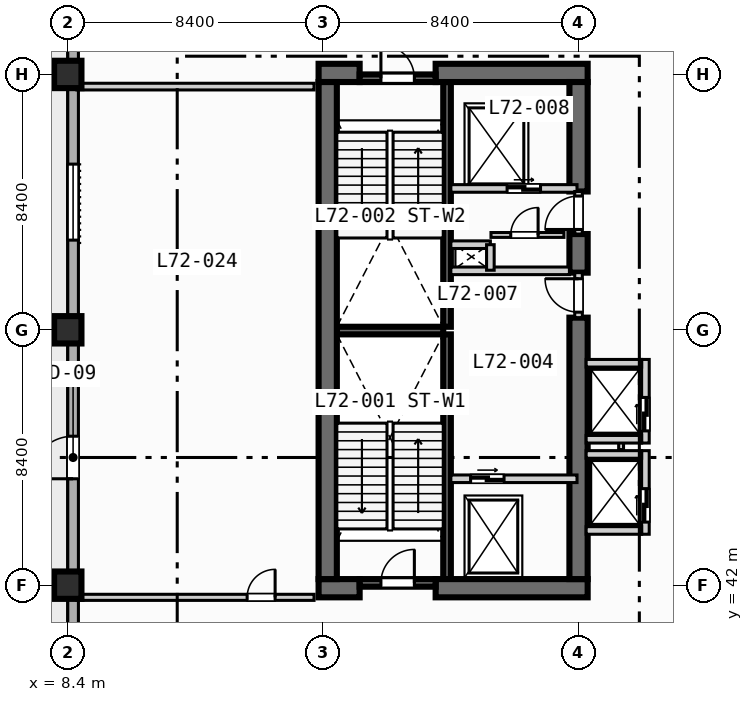
"""IFC4 building model, lengths in metres.
Left out: names, types, materials, properties, quantities, classifications, styles, units other than length and angle.
Written with IfcOpenShell. Run it as: python <this file> out.ifc"""

import sys

from ifc_helpers import new_model, si_unit, direction, frame, frame_2d, origin, origin_2d, place, context, subcontext, project, spatial, rectangle, extrude, element, fill, save


model = new_model("IFC4")
c1 = context("Model", 3, precision=1e-05, world=origin(), true_north=direction((0.0, 1.0)))
c2 = subcontext(c1, "Body", "Model", "MODEL_VIEW")
j1 = project(units=[si_unit("LENGTHUNIT", "METRE"), si_unit("PLANEANGLEUNIT", "RADIAN")], contexts=[c1])
p1 = place(None, origin())
s1 = spatial("IfcSite", under=j1, at=p1, CompositionType="ELEMENT")
p2 = place(p1, origin())
s2 = spatial("IfcBuilding", under=s1, at=p2, CompositionType="ELEMENT")
p3 = place(p2, frame((0.0, 0.0, 290.4)))
s3 = spatial("IfcBuildingStorey", under=s2, at=p3, CompositionType="ELEMENT", Elevation=290.4)
for number, where, z_axis, x_axis in (
    (1, (20.875, 42.2, 0.0), (0.0, 0.0, 1.0), (0.0, 1.0, 0.0)),
    (2, (20.875, 50.5, 0.0), (0.0, 0.0, 1.0), (0.0, 1.0, 0.0)),
):
    element("IfcWall", number, at=place(p3, frame(where, z_axis=z_axis, x_axis=x_axis)), inside=s3, PredefinedType="SOLIDWALL", context=c2, shape_type="SweptSolid", body=[
        extrude(rectangle(XDim=8.05, YDim=0.25, at=frame_2d((4.025, 0.0))), origin(), (0.0, 0.0, 1.0), 4.05),
    ])
p4 = place(p3, frame((17.25, 50.375, 0.0), z_axis=(0.0, 0.0, 1.0), x_axis=(1.0, 0.0, 0.0)))
e3 = element("IfcWall", 3, at=p4, inside=s3, PredefinedType="SOLIDWALL", context=c2, shape_type="SweptSolid", body=[
    extrude(rectangle(XDim=3.5, YDim=0.25, at=frame_2d((1.75, 0.0))), origin(), (0.0, 0.0, 1.0), 4.05),
])
p5 = place(p3, frame((16.65, 41.9, 0.0), z_axis=(0.0, 0.0, 1.0), x_axis=(1.0, 0.0, 0.0)))
e4 = element("IfcWall", 4, at=p5, inside=s3, PredefinedType="SHEAR", context=c2, shape_type="SweptSolid", body=[
    extrude(rectangle(XDim=1.35, YDim=0.6, at=frame_2d((0.675, 0.0))), origin(), (0.0, 0.0, 1.0), 4.05),
])
p6 = place(p3, frame((20.5, 41.9, 0.0), z_axis=(0.0, 0.0, 1.0), x_axis=(1.0, 0.0, 0.0)))
e5 = element("IfcWall", 5, at=p6, inside=s3, PredefinedType="SHEAR", context=c2, shape_type="SweptSolid", body=[
    extrude(rectangle(XDim=5.0, YDim=0.6, at=frame_2d((2.5, 0.0))), origin(), (0.0, 0.0, 1.0), 4.05),
])
p7 = place(p3, frame((16.65, 58.85, 0.0), z_axis=(0.0, 0.0, 1.0), x_axis=(1.0, 0.0, 0.0)))
e6 = element("IfcWall", 6, at=p7, inside=s3, PredefinedType="SHEAR", context=c2, shape_type="SweptSolid", body=[
    extrude(rectangle(XDim=1.35, YDim=0.6, at=frame_2d((0.675, 0.0))), origin(), (0.0, 0.0, 1.0), 4.05),
])
p8 = place(p3, frame((20.5, 58.85, 0.0), z_axis=(0.0, 0.0, 1.0), x_axis=(1.0, 0.0, 0.0)))
e7 = element("IfcWall", 7, at=p8, inside=s3, PredefinedType="SHEAR", context=c2, shape_type="SweptSolid", body=[
    extrude(rectangle(XDim=5.0, YDim=0.6, at=frame_2d((2.5, 0.0))), origin(), (0.0, 0.0, 1.0), 4.05),
])
p9 = place(p3, frame((16.95, 42.2, 0.0), z_axis=(0.0, 0.0, 1.0), x_axis=(0.0, 1.0, 0.0)))
e8 = element("IfcWall", 8, at=p9, inside=s3, PredefinedType="SHEAR", context=c2, shape_type="SweptSolid", body=[
    extrude(rectangle(XDim=16.35, YDim=0.6, at=frame_2d((8.175, 0.0))), origin(), (0.0, 0.0, 1.0), 4.05),
])
p10 = place(p3, frame((25.2, 42.2, 0.0), z_axis=(0.0, 0.0, 1.0), x_axis=(0.0, 1.0, 0.0)))
e9 = element("IfcWall", 9, at=p10, inside=s3, PredefinedType="SHEAR", context=c2, shape_type="SweptSolid", body=[
    extrude(rectangle(XDim=8.6, YDim=0.6, at=frame_2d((4.3, 0.0))), origin(), (0.0, 0.0, 1.0), 4.05),
])
p11 = place(p3, frame((25.2, 52.28, 0.0), z_axis=(0.0, 0.0, 1.0), x_axis=(0.0, 1.0, 0.0)))
e10 = element("IfcWall", 10, at=p11, inside=s3, PredefinedType="SHEAR", context=c2, shape_type="SweptSolid", body=[
    extrude(rectangle(XDim=1.27, YDim=0.6, at=frame_2d((0.635, 0.0))), origin(), (0.0, 0.0, 1.0), 4.05),
])
p12 = place(p3, frame((25.2, 54.95, 0.0), z_axis=(0.0, 0.0, 1.0), x_axis=(0.0, 1.0, 0.0)))
e11 = element("IfcWall", 11, at=p12, inside=s3, PredefinedType="SHEAR", context=c2, shape_type="SweptSolid", body=[
    extrude(rectangle(XDim=3.6, YDim=0.6, at=frame_2d((1.8, 0.0))), origin(), (0.0, 0.0, 1.0), 4.05),
])
for number, where, z_axis, x_axis in (
    (12, (8.4, 42.0, 0.0), (0.0, 0.0, 1.0), (1.0, 0.0, 0.0)),
    (13, (8.4, 50.4, 0.0), (0.0, 0.0, 1.0), (1.0, 0.0, 0.0)),
    (14, (8.4, 58.8, 0.0), (0.0, 0.0, 1.0), (1.0, 0.0, 0.0)),
):
    element("IfcColumn", number, at=place(p3, frame(where, z_axis=z_axis, x_axis=x_axis)), inside=s3, PredefinedType="COLUMN", context=c2, shape_type="SweptSolid", body=[
        extrude(rectangle(XDim=0.9, YDim=0.9, at=origin_2d()), origin(), (0.0, 0.0, 1.0), 4.4),
    ])
p13 = place(p3, frame((8.575, 11.575, 0.0), z_axis=(0.0, 0.0, 1.0), x_axis=(0.0, 1.0, 0.0)))
e15 = element("IfcWall", 15, at=p13, inside=s3, PredefinedType="STANDARD", context=c2, shape_type="SweptSolid", body=[
    extrude(rectangle(XDim=60.85, YDim=0.35, at=frame_2d((30.425, 0.0))), origin(), (0.0, 0.0, 1.0), 4.05),
])
p14 = place(p13, frame((33.925, 0.0, 0.0)))
e16 = element("IfcOpeningElement", 16, at=p14, cuts=e15, PredefinedType="OPENING", context=c2, shape_type="SweptSolid", body=[
    extrude(rectangle(XDim=1.4, YDim=2.2, at=frame_2d((0.7, 1.1))), frame((0.0, 0.185, 0.0), z_axis=(0.0, -1.0, 0.0), x_axis=(1.0, 0.0, 0.0)), (0.0, 0.0, 1.0), 0.37),
])
p15 = place(p13, frame((8.175, 0.0, 0.85)))
e17 = element("IfcOpeningElement", 17, at=p15, cuts=e15, PredefinedType="OPENING", context=c2, shape_type="SweptSolid", body=[
    extrude(rectangle(XDim=2.5, YDim=2.2, at=frame_2d((1.25, 1.1))), frame((0.0, 0.185, 0.0), z_axis=(0.0, -1.0, 0.0), x_axis=(1.0, 0.0, 0.0)), (0.0, 0.0, 1.0), 0.37),
])
p16 = place(p13, frame((16.575, 0.0, 0.85)))
e18 = element("IfcOpeningElement", 18, at=p16, cuts=e15, PredefinedType="OPENING", context=c2, shape_type="SweptSolid", body=[
    extrude(rectangle(XDim=2.5, YDim=2.2, at=frame_2d((1.25, 1.1))), frame((0.0, 0.185, 0.0), z_axis=(0.0, -1.0, 0.0), x_axis=(1.0, 0.0, 0.0)), (0.0, 0.0, 1.0), 0.37),
])
p17 = place(p13, frame((24.975, 0.0, 0.85)))
e19 = element("IfcOpeningElement", 19, at=p17, cuts=e15, PredefinedType="OPENING", context=c2, shape_type="SweptSolid", body=[
    extrude(rectangle(XDim=2.5, YDim=2.2, at=frame_2d((1.25, 1.1))), frame((0.0, 0.185, 0.0), z_axis=(0.0, -1.0, 0.0), x_axis=(1.0, 0.0, 0.0)), (0.0, 0.0, 1.0), 0.37),
])
p18 = place(p13, frame((41.775, 0.0, 0.85)))
e20 = element("IfcOpeningElement", 20, at=p18, cuts=e15, PredefinedType="OPENING", context=c2, shape_type="SweptSolid", body=[
    extrude(rectangle(XDim=2.5, YDim=2.2, at=frame_2d((1.25, 1.1))), frame((0.0, 0.185, 0.0), z_axis=(0.0, -1.0, 0.0), x_axis=(1.0, 0.0, 0.0)), (0.0, 0.0, 1.0), 0.37),
])
p19 = place(p3, frame((18.0, 42.075, 0.0), z_axis=(0.0, 0.0, 1.0), x_axis=(1.0, 0.0, 0.0)))
e21 = element("IfcWall", 21, at=p19, inside=s3, PredefinedType="SOLIDWALL", context=c2, shape_type="SweptSolid", body=[
    extrude(rectangle(XDim=2.5, YDim=0.25, at=frame_2d((1.25, 0.0))), origin(), (0.0, 0.0, 1.0), 4.05),
])
p20 = place(p19, frame((0.7, 0.0, 0.0)))
e22 = element("IfcOpeningElement", 22, at=p20, cuts=e21, PredefinedType="OPENING", context=c2, shape_type="SweptSolid", body=[
    extrude(rectangle(XDim=1.1, YDim=2.15, at=frame_2d((0.55, 1.075))), frame((0.0, 0.135, 0.0), z_axis=(0.0, -1.0, 0.0), x_axis=(1.0, 0.0, 0.0)), (0.0, 0.0, 1.0), 0.27),
])
p21 = place(p3, frame((18.0, 58.675, 0.0), z_axis=(0.0, 0.0, 1.0), x_axis=(1.0, 0.0, 0.0)))
e23 = element("IfcWall", 23, at=p21, inside=s3, PredefinedType="SOLIDWALL", context=c2, shape_type="SweptSolid", body=[
    extrude(rectangle(XDim=2.5, YDim=0.25, at=frame_2d((1.25, 0.0))), origin(), (0.0, 0.0, 1.0), 4.05),
])
p22 = place(p21, frame((0.7, 0.0, 0.0)))
e24 = element("IfcOpeningElement", 24, at=p22, cuts=e23, PredefinedType="OPENING", context=c2, shape_type="SweptSolid", body=[
    extrude(rectangle(XDim=1.1, YDim=2.15, at=frame_2d((0.55, 1.075))), frame((0.0, 0.135, 0.0), z_axis=(0.0, -1.0, 0.0), x_axis=(1.0, 0.0, 0.0)), (0.0, 0.0, 1.0), 0.27),
])
p23 = place(p3, frame((21.0, 45.5, 0.0), z_axis=(0.0, 0.0, 1.0), x_axis=(1.0, 0.0, 0.0)))
e25 = element("IfcWall", 25, at=p23, inside=s3, PredefinedType="SOLIDWALL", context=c2, shape_type="SweptSolid", body=[
    extrude(rectangle(XDim=4.15, YDim=0.25, at=frame_2d((2.075, 0.0))), origin(), (0.0, 0.0, 1.0), 4.05),
])
p24 = place(p23, frame((0.65, 0.0, 0.0)))
e26 = element("IfcOpeningElement", 26, at=p24, cuts=e25, PredefinedType="OPENING", context=c2, shape_type="SweptSolid", body=[
    extrude(rectangle(XDim=1.1, YDim=2.15, at=frame_2d((0.55, 1.075))), frame((0.0, 0.135, 0.0), z_axis=(0.0, -1.0, 0.0), x_axis=(1.0, 0.0, 0.0)), (0.0, 0.0, 1.0), 0.27),
])
p25 = place(p3, frame((25.2, 50.8, 0.0), z_axis=(0.0, 0.0, 1.0), x_axis=(0.0, 1.0, 0.0)))
e27 = element("IfcWall", 27, at=p25, inside=s3, PredefinedType="SOLIDWALL", context=c2, shape_type="SweptSolid", body=[
    extrude(rectangle(XDim=1.48, YDim=0.25, at=frame_2d((0.74, 0.0))), origin(), (0.0, 0.0, 1.0), 4.05),
])
p26 = place(p25, frame((0.18, 0.0, 0.0)))
e28 = element("IfcOpeningElement", 28, at=p26, cuts=e27, PredefinedType="OPENING", context=c2, shape_type="SweptSolid", body=[
    extrude(rectangle(XDim=1.1, YDim=2.15, at=frame_2d((0.55, 1.075))), frame((0.0, 0.135, 0.0), z_axis=(0.0, -1.0, 0.0), x_axis=(1.0, 0.0, 0.0)), (0.0, 0.0, 1.0), 0.27),
])
p27 = place(p3, frame((21.0, 52.34, 0.0), z_axis=(0.0, 0.0, 1.0), x_axis=(1.0, 0.0, 0.0)))
e29 = element("IfcWall", 29, at=p27, inside=s3, PredefinedType="SOLIDWALL", context=c2, shape_type="SweptSolid", body=[
    extrude(rectangle(XDim=3.9, YDim=0.25, at=frame_2d((1.95, 0.0))), origin(), (0.0, 0.0, 1.0), 4.05),
])
p28 = place(p3, frame((21.0, 55.05, 0.0), z_axis=(0.0, 0.0, 1.0), x_axis=(1.0, 0.0, 0.0)))
e30 = element("IfcWall", 30, at=p28, inside=s3, PredefinedType="SOLIDWALL", context=c2, shape_type="SweptSolid", body=[
    extrude(rectangle(XDim=4.15, YDim=0.25, at=frame_2d((2.075, 0.0))), origin(), (0.0, 0.0, 1.0), 4.05),
])
p29 = place(p28, frame((1.85, 0.0, 0.0)))
e31 = element("IfcOpeningElement", 31, at=p29, cuts=e30, PredefinedType="OPENING", context=c2, shape_type="SweptSolid", body=[
    extrude(rectangle(XDim=1.1, YDim=2.15, at=frame_2d((0.55, 1.075))), frame((0.0, 0.135, 0.0), z_axis=(0.0, -1.0, 0.0), x_axis=(1.0, 0.0, 0.0)), (0.0, 0.0, 1.0), 0.27),
])
p30 = place(p3, frame((25.2, 53.55, 0.0), z_axis=(0.0, 0.0, 1.0), x_axis=(0.0, 1.0, 0.0)))
e32 = element("IfcWall", 32, at=p30, inside=s3, PredefinedType="SOLIDWALL", context=c2, shape_type="SweptSolid", body=[
    extrude(rectangle(XDim=1.4, YDim=0.25, at=frame_2d((0.7, 0.0))), origin(), (0.0, 0.0, 1.0), 4.05),
])
p31 = place(p30, frame((0.15, 0.0, 0.0)))
e33 = element("IfcOpeningElement", 33, at=p31, cuts=e32, PredefinedType="OPENING", context=c2, shape_type="SweptSolid", body=[
    extrude(rectangle(XDim=1.1, YDim=2.15, at=frame_2d((0.55, 1.075))), frame((0.0, 0.135, 0.0), z_axis=(0.0, -1.0, 0.0), x_axis=(1.0, 0.0, 0.0)), (0.0, 0.0, 1.0), 0.27),
])
p32 = place(p3, frame((21.0, 53.2, 0.0), z_axis=(0.0, 0.0, 1.0), x_axis=(1.0, 0.0, 0.0)))
e34 = element("IfcWall", 34, at=p32, inside=s3, PredefinedType="SOLIDWALL", context=c2, shape_type="SweptSolid", body=[
    extrude(rectangle(XDim=1.3, YDim=0.25, at=frame_2d((0.65, 0.0))), origin(), (0.0, 0.0, 1.0), 4.05),
])
p33 = place(p3, frame((22.3, 52.36, 0.0), z_axis=(0.0, 0.0, 1.0), x_axis=(0.0, 1.0, 0.0)))
e35 = element("IfcWall", 35, at=p33, inside=s3, PredefinedType="SOLIDWALL", context=c2, shape_type="SweptSolid", body=[
    extrude(rectangle(XDim=0.84, YDim=0.25, at=frame_2d((0.42, 0.0))), origin(), (0.0, 0.0, 1.0), 4.05),
])
p34 = place(p3, frame((22.32, 53.52, 0.0), z_axis=(0.0, 0.0, 1.0), x_axis=(1.0, 0.0, 0.0)))
e36 = element("IfcWall", 36, at=p34, inside=s3, PredefinedType="PARTITIONING", context=c2, shape_type="SweptSolid", body=[
    extrude(rectangle(XDim=2.4, YDim=0.16, at=frame_2d((1.2, 0.0))), origin(), (0.0, 0.0, 1.0), 4.05),
])
p35 = place(p34, frame((0.65, 0.0, 0.0)))
e37 = element("IfcOpeningElement", 37, at=p35, cuts=e36, PredefinedType="OPENING", context=c2, shape_type="SweptSolid", body=[
    extrude(rectangle(XDim=0.9, YDim=2.1, at=frame_2d((0.45, 1.05))), frame((0.0, 0.09, 0.0), z_axis=(0.0, -1.0, 0.0), x_axis=(1.0, 0.0, 0.0)), (0.0, 0.0, 1.0), 0.18),
])
p36 = place(p3, frame((27.4, 43.675, 0.0), z_axis=(0.0, 0.0, 1.0), x_axis=(0.0, 1.0, 0.0)))
e38 = element("IfcWall", 38, at=p36, inside=s3, PredefinedType="SOLIDWALL", context=c2, shape_type="SweptSolid", body=[
    extrude(rectangle(XDim=2.75, YDim=0.25, at=frame_2d((1.375, 0.0))), origin(), (0.0, 0.0, 1.0), 4.05),
])
p37 = place(p36, frame((0.4, 0.0, 0.0)))
e39 = element("IfcOpeningElement", 39, at=p37, cuts=e38, PredefinedType="OPENING", context=c2, shape_type="SweptSolid", body=[
    extrude(rectangle(XDim=1.1, YDim=2.15, at=frame_2d((0.55, 1.075))), frame((0.0, 0.135, 0.0), z_axis=(0.0, -1.0, 0.0), x_axis=(1.0, 0.0, 0.0)), (0.0, 0.0, 1.0), 0.27),
])
for number, where, z_axis, x_axis in (
    (40, (25.45, 43.8, 0.0), (0.0, 0.0, 1.0), (1.0, 0.0, 0.0)),
    (41, (25.45, 46.3, 0.0), (0.0, 0.0, 1.0), (1.0, 0.0, 0.0)),
):
    element("IfcWall", number, at=place(p3, frame(where, z_axis=z_axis, x_axis=x_axis)), inside=s3, PredefinedType="SOLIDWALL", context=c2, shape_type="SweptSolid", body=[
        extrude(rectangle(XDim=1.825, YDim=0.25, at=frame_2d((0.913, 0.0))), origin(), (0.0, 0.0, 1.0), 4.05),
    ])
p38 = place(p3, frame((26.6, 46.46, 0.0), z_axis=(0.0, 0.0, 1.0), x_axis=(0.0, 1.0, 0.0)))
e42 = element("IfcWall", 42, at=p38, inside=s3, PredefinedType="PARTITIONING", context=c2, shape_type="SweptSolid", body=[
    extrude(rectangle(XDim=0.88, YDim=0.16, at=frame_2d((0.44, 0.0))), origin(), (0.0, 0.0, 1.0), 4.05),
])
p39 = place(p3, frame((27.4, 46.675, 0.0), z_axis=(0.0, 0.0, 1.0), x_axis=(0.0, 1.0, 0.0)))
e43 = element("IfcWall", 43, at=p39, inside=s3, PredefinedType="SOLIDWALL", context=c2, shape_type="SweptSolid", body=[
    extrude(rectangle(XDim=2.75, YDim=0.25, at=frame_2d((1.375, 0.0))), origin(), (0.0, 0.0, 1.0), 4.05),
])
p40 = place(p39, frame((0.4, 0.0, 0.0)))
e44 = element("IfcOpeningElement", 44, at=p40, cuts=e43, PredefinedType="OPENING", context=c2, shape_type="SweptSolid", body=[
    extrude(rectangle(XDim=1.1, YDim=2.15, at=frame_2d((0.55, 1.075))), frame((0.0, 0.135, 0.0), z_axis=(0.0, -1.0, 0.0), x_axis=(1.0, 0.0, 0.0)), (0.0, 0.0, 1.0), 0.27),
])
for number, where, z_axis, x_axis in (
    (45, (25.45, 46.8, 0.0), (0.0, 0.0, 1.0), (1.0, 0.0, 0.0)),
    (46, (25.45, 49.3, 0.0), (0.0, 0.0, 1.0), (1.0, 0.0, 0.0)),
):
    element("IfcWall", number, at=place(p3, frame(where, z_axis=z_axis, x_axis=x_axis)), inside=s3, PredefinedType="SOLIDWALL", context=c2, shape_type="SweptSolid", body=[
        extrude(rectangle(XDim=1.825, YDim=0.25, at=frame_2d((0.913, 0.0))), origin(), (0.0, 0.0, 1.0), 4.05),
    ])
p41 = place(p3, frame((8.7, 41.6, 0.0), z_axis=(0.0, 0.0, 1.0), x_axis=(1.0, 0.0, 0.0)))
e47 = element("IfcWall", 47, at=p41, inside=s3, PredefinedType="PARTITIONING", context=c2, shape_type="SweptSolid", body=[
    extrude(rectangle(XDim=7.8, YDim=0.2, at=frame_2d((3.9, 0.0))), origin(), (0.0, 0.0, 1.0), 4.05),
])
p42 = place(p41, frame((5.6, 0.0, 0.0)))
e48 = element("IfcOpeningElement", 48, at=p42, cuts=e47, PredefinedType="OPENING", context=c2, shape_type="SweptSolid", body=[
    extrude(rectangle(XDim=0.92, YDim=2.1, at=frame_2d((0.46, 1.05))), frame((0.0, 0.11, 0.0), z_axis=(0.0, -1.0, 0.0), x_axis=(1.0, 0.0, 0.0)), (0.0, 0.0, 1.0), 0.22),
])
p43 = place(p3, frame((8.7, 58.4, 0.0), z_axis=(0.0, 0.0, 1.0), x_axis=(1.0, 0.0, 0.0)))
e49 = element("IfcWall", 49, at=p43, inside=s3, PredefinedType="PARTITIONING", context=c2, shape_type="SweptSolid", body=[
    extrude(rectangle(XDim=7.8, YDim=0.22, at=frame_2d((3.9, 0.0))), origin(), (0.0, 0.0, 1.0), 4.05),
])
p44 = place(p14, origin())
e50 = element("IfcDoor", 50, at=p44, inside=s3, OperationType="SINGLE_SWING_LEFT", PredefinedType="DOOR", context=c2, shape_type="SweptSolid", body=[
    extrude(rectangle(XDim=1.4, YDim=2.2, at=frame_2d((0.7, 1.1))), frame((0.0, 0.025, 0.0), z_axis=(0.0, -1.0, 0.0), x_axis=(1.0, 0.0, 0.0)), (0.0, 0.0, 1.0), 0.05),
])
fill(e16, e50)
p45 = place(p18, origin())
e51 = element("IfcWindow", 51, at=p45, inside=s3, PartitioningType="SINGLE_PANEL", PredefinedType="WINDOW", context=c2, shape_type="SweptSolid", body=[
    extrude(rectangle(XDim=2.5, YDim=2.2, at=frame_2d((1.25, 1.1))), frame((0.0, 0.03, 0.0), z_axis=(0.0, -1.0, 0.0), x_axis=(1.0, 0.0, 0.0)), (0.0, 0.0, 1.0), 0.06),
])
fill(e20, e51)
p46 = place(p20, origin())
e52 = element("IfcDoor", 52, at=p46, inside=s3, OperationType="SINGLE_SWING_RIGHT", PredefinedType="DOOR", context=c2, shape_type="SweptSolid", body=[
    extrude(rectangle(XDim=1.1, YDim=2.15, at=frame_2d((0.55, 1.075))), frame((0.0, 0.025, 0.0), z_axis=(0.0, -1.0, 0.0), x_axis=(1.0, 0.0, 0.0)), (0.0, 0.0, 1.0), 0.05),
])
fill(e22, e52)
p47 = place(p22, origin())
e53 = element("IfcDoor", 53, at=p47, inside=s3, OperationType="SINGLE_SWING_LEFT", PredefinedType="DOOR", context=c2, shape_type="SweptSolid", body=[
    extrude(rectangle(XDim=1.1, YDim=2.15, at=frame_2d((0.55, 1.075))), frame((0.0, 0.025, 0.0), z_axis=(0.0, -1.0, 0.0), x_axis=(1.0, 0.0, 0.0)), (0.0, 0.0, 1.0), 0.05),
])
fill(e24, e53)
p48 = place(p24, origin())
e54 = element("IfcDoor", 54, at=p48, inside=s3, OperationType="SLIDING_TO_LEFT", PredefinedType="DOOR", context=c2, shape_type="SweptSolid", body=[
    extrude(rectangle(XDim=1.1, YDim=2.15, at=frame_2d((0.55, 1.075))), frame((0.0, 0.025, 0.0), z_axis=(0.0, -1.0, 0.0), x_axis=(1.0, 0.0, 0.0)), (0.0, 0.0, 1.0), 0.05),
])
fill(e26, e54)
p49 = place(p26, origin())
e55 = element("IfcDoor", 55, at=p49, inside=s3, OperationType="SINGLE_SWING_RIGHT", PredefinedType="DOOR", context=c2, shape_type="SweptSolid", body=[
    extrude(rectangle(XDim=1.1, YDim=2.15, at=frame_2d((0.55, 1.075))), frame((0.0, 0.025, 0.0), z_axis=(0.0, -1.0, 0.0), x_axis=(1.0, 0.0, 0.0)), (0.0, 0.0, 1.0), 0.05),
])
fill(e28, e55)
p50 = place(p29, origin())
e56 = element("IfcDoor", 56, at=p50, inside=s3, OperationType="SLIDING_TO_LEFT", PredefinedType="DOOR", context=c2, shape_type="SweptSolid", body=[
    extrude(rectangle(XDim=1.1, YDim=2.15, at=frame_2d((0.55, 1.075))), frame((0.0, 0.025, 0.0), z_axis=(0.0, -1.0, 0.0), x_axis=(1.0, 0.0, 0.0)), (0.0, 0.0, 1.0), 0.05),
])
fill(e31, e56)
p51 = place(p31, origin())
e57 = element("IfcDoor", 57, at=p51, inside=s3, OperationType="SINGLE_SWING_LEFT", PredefinedType="DOOR", context=c2, shape_type="SweptSolid", body=[
    extrude(rectangle(XDim=1.1, YDim=2.15, at=frame_2d((0.55, 1.075))), frame((0.0, 0.025, 0.0), z_axis=(0.0, -1.0, 0.0), x_axis=(1.0, 0.0, 0.0)), (0.0, 0.0, 1.0), 0.05),
])
fill(e33, e57)
p52 = place(p35, origin())
e58 = element("IfcDoor", 58, at=p52, inside=s3, OperationType="SINGLE_SWING_RIGHT", PredefinedType="DOOR", context=c2, shape_type="SweptSolid", body=[
    extrude(rectangle(XDim=0.9, YDim=2.1, at=frame_2d((0.45, 1.05))), frame((0.0, 0.025, 0.0), z_axis=(0.0, -1.0, 0.0), x_axis=(1.0, 0.0, 0.0)), (0.0, 0.0, 1.0), 0.05),
])
fill(e37, e58)
p53 = place(p37, origin())
e59 = element("IfcDoor", 59, at=p53, inside=s3, OperationType="SLIDING_TO_LEFT", PredefinedType="DOOR", context=c2, shape_type="SweptSolid", body=[
    extrude(rectangle(XDim=1.1, YDim=2.15, at=frame_2d((0.55, 1.075))), frame((0.0, 0.025, 0.0), z_axis=(0.0, -1.0, 0.0), x_axis=(1.0, 0.0, 0.0)), (0.0, 0.0, 1.0), 0.05),
])
fill(e39, e59)
p54 = place(p40, origin())
e60 = element("IfcDoor", 60, at=p54, inside=s3, OperationType="SLIDING_TO_LEFT", PredefinedType="DOOR", context=c2, shape_type="SweptSolid", body=[
    extrude(rectangle(XDim=1.1, YDim=2.15, at=frame_2d((0.55, 1.075))), frame((0.0, 0.025, 0.0), z_axis=(0.0, -1.0, 0.0), x_axis=(1.0, 0.0, 0.0)), (0.0, 0.0, 1.0), 0.05),
])
fill(e44, e60)
p55 = place(p42, origin())
e61 = element("IfcDoor", 61, at=p55, inside=s3, OperationType="SINGLE_SWING_RIGHT", PredefinedType="DOOR", context=c2, shape_type="SweptSolid", body=[
    extrude(rectangle(XDim=0.92, YDim=2.1, at=frame_2d((0.46, 1.05))), frame((0.0, 0.025, 0.0), z_axis=(0.0, -1.0, 0.0), x_axis=(1.0, 0.0, 0.0)), (0.0, 0.0, 1.0), 0.05),
])
fill(e48, e61)
save(model, sys.argv[1])
